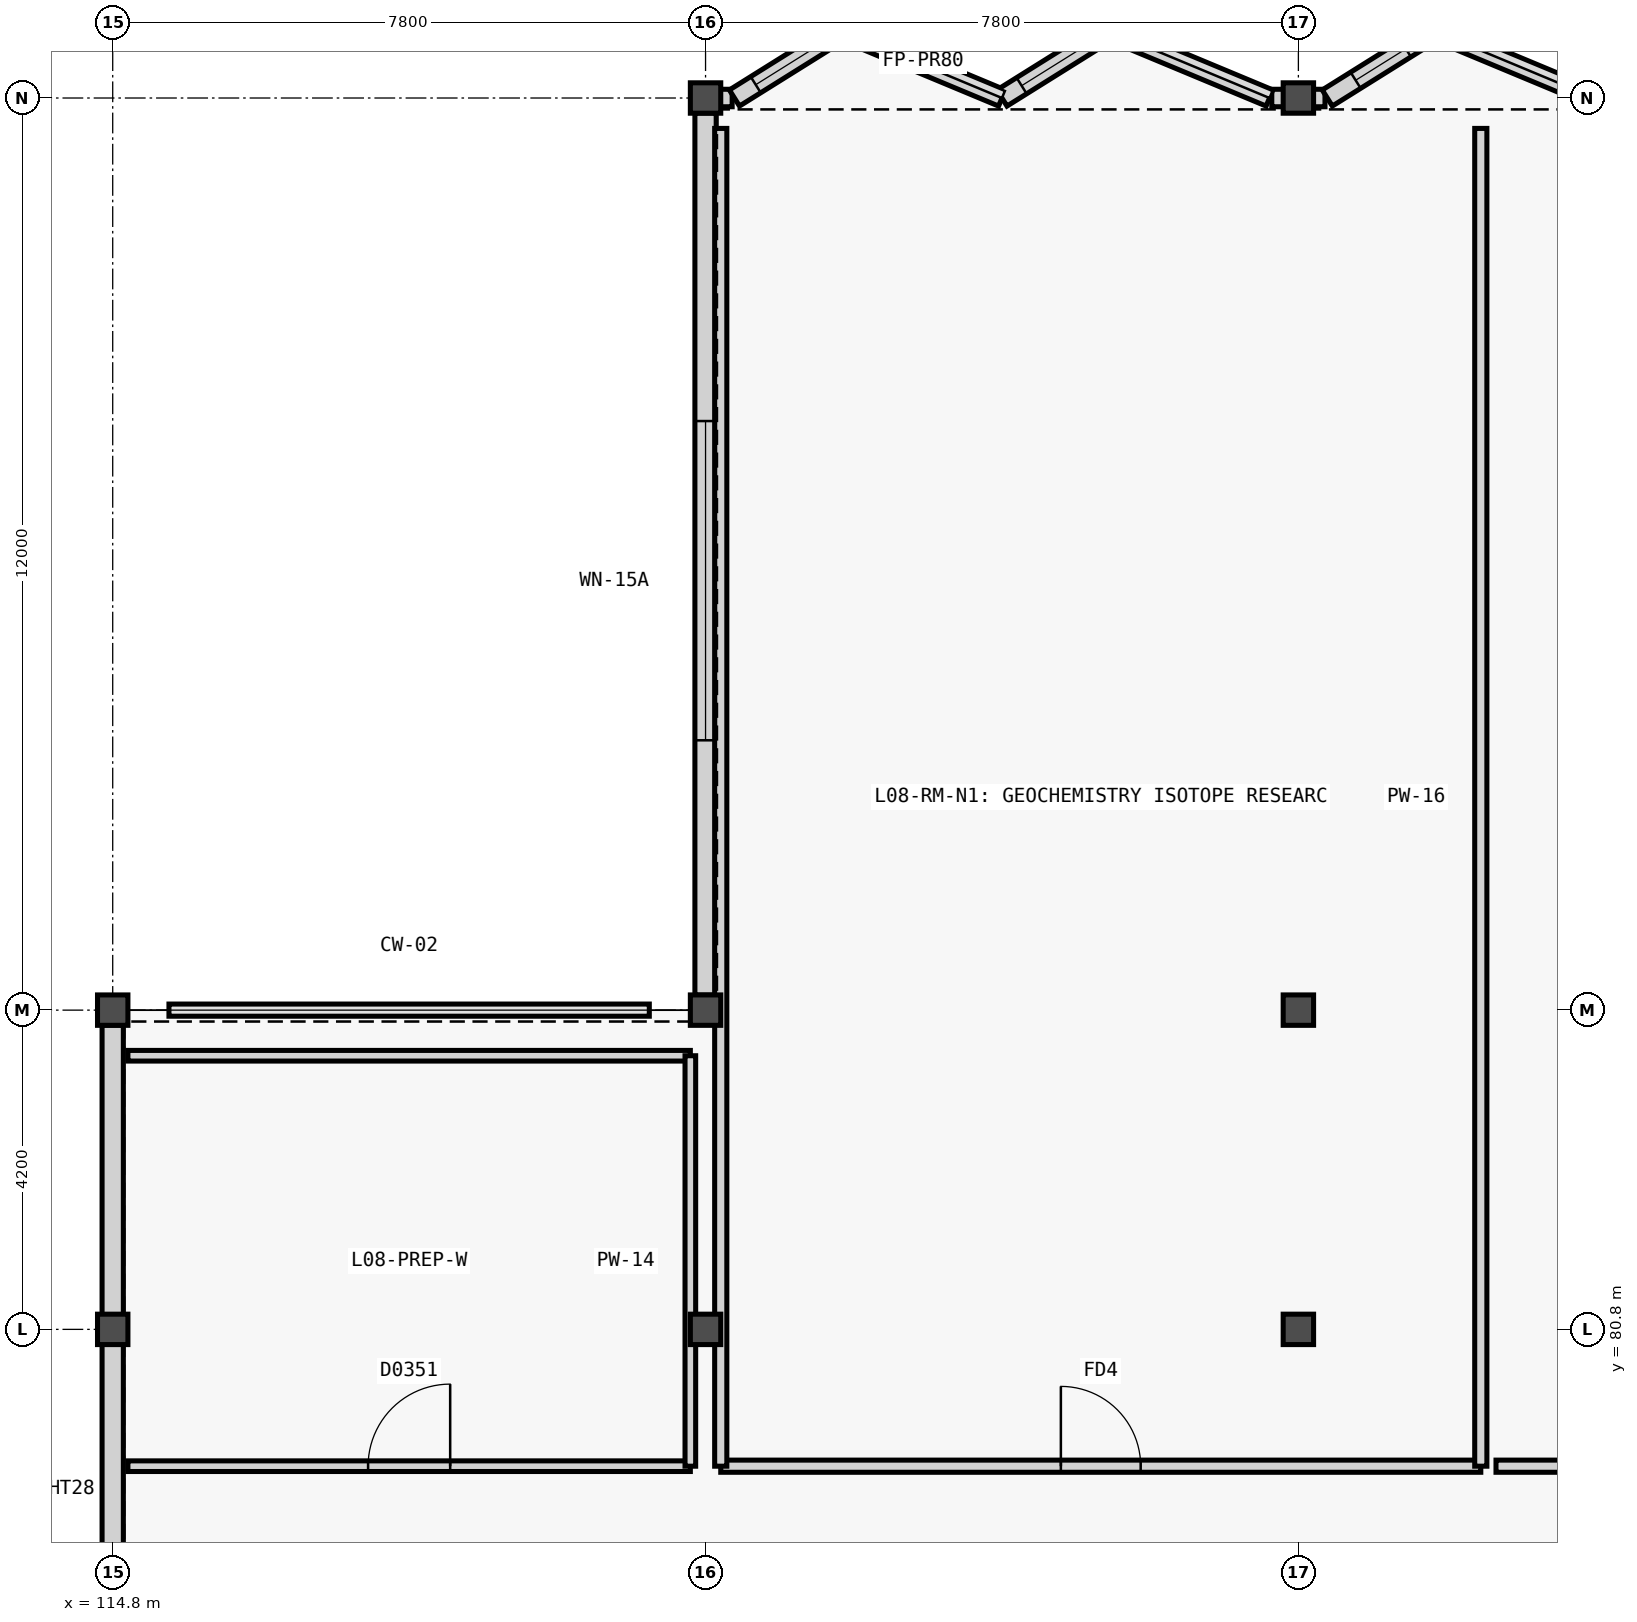
"""IFC4 building model, lengths in metres.
Left out: names, types, materials, properties, quantities, classifications, styles, units other than length and angle.
Written with IfcOpenShell. Run it as: python <this file> out.ifc"""

import sys

from ifc_helpers import new_model, si_unit, direction, frame, frame_2d, origin, origin_2d, place, context, subcontext, project, spatial, rectangle, extrude, element, fill, save


model = new_model("IFC4")
c1 = context("Model", 3, precision=1e-05, world=origin(), true_north=direction((0.0, 1.0)))
c2 = subcontext(c1, "Body", "Model", "MODEL_VIEW")
j1 = project(units=[si_unit("LENGTHUNIT", "METRE"), si_unit("PLANEANGLEUNIT", "RADIAN")], contexts=[c1])
p1 = place(None, origin())
s1 = spatial("IfcSite", under=j1, at=p1, CompositionType="ELEMENT")
p2 = place(p1, origin())
s2 = spatial("IfcBuilding", under=s1, at=p2, CompositionType="ELEMENT")
p3 = place(p2, frame((0.0, 0.0, 32.4)))
s3 = spatial("IfcBuildingStorey", under=s2, at=p3, CompositionType="ELEMENT", Elevation=32.4)
for number, where, z_axis, x_axis in (
    (1, (114.8, 80.8, 0.0), (0.0, 0.0, 1.0), (1.0, 0.0, 0.0)),
    (2, (114.8, 85.0, 0.0), (0.0, 0.0, 1.0), (1.0, 0.0, 0.0)),
    (3, (122.6, 80.8, 0.0), (0.0, 0.0, 1.0), (1.0, 0.0, 0.0)),
    (4, (122.6, 85.0, 0.0), (0.0, 0.0, 1.0), (1.0, 0.0, 0.0)),
    (5, (122.6, 97.0, 0.0), (0.0, 0.0, 1.0), (1.0, 0.0, 0.0)),
    (6, (130.4, 80.8, 0.0), (0.0, 0.0, 1.0), (1.0, 0.0, 0.0)),
    (7, (130.4, 85.0, 0.0), (0.0, 0.0, 1.0), (1.0, 0.0, 0.0)),
    (8, (130.4, 97.0, 0.0), (0.0, 0.0, 1.0), (1.0, 0.0, 0.0)),
):
    element("IfcColumn", number, at=place(p3, frame(where, z_axis=z_axis, x_axis=x_axis)), inside=s3, PredefinedType="COLUMN", context=c2, shape_type="SweptSolid", body=[
        extrude(rectangle(XDim=0.4, YDim=0.4, at=origin_2d()), origin(), (0.0, 0.0, 1.0), 3.6),
    ])
p4 = place(p3, frame((122.6, 85.198, 0.0), z_axis=(0.0, 0.0, 1.0), x_axis=(0.0, 1.0, 0.0)))
e9 = element("IfcWall", 9, at=p4, inside=s3, PredefinedType="SOLIDWALL", context=c2, shape_type="SweptSolid", body=[
    extrude(rectangle(XDim=11.604, YDim=0.28, at=frame_2d((5.802, 0.0))), origin(), (0.0, 0.0, 1.0), 2.9),
])
p5 = place(p4, frame((3.352, 0.0, 0.82)))
e10 = element("IfcOpeningElement", 10, at=p5, cuts=e9, PredefinedType="OPENING", context=c2, shape_type="SweptSolid", body=[
    extrude(rectangle(XDim=4.2, YDim=1.5, at=frame_2d((2.1, 0.75))), frame((0.0, 0.15, 0.0), z_axis=(0.0, -1.0, 0.0), x_axis=(1.0, 0.0, 0.0)), (0.0, 0.0, 1.0), 0.3),
])
p6 = place(p3, frame((114.8, 72.598, 0.0), z_axis=(0.0, 0.0, 1.0), x_axis=(0.0, 1.0, 0.0)))
e11 = element("IfcWall", 11, at=p6, inside=s3, PredefinedType="SOLIDWALL", context=c2, shape_type="SweptSolid", body=[
    extrude(rectangle(XDim=12.204, YDim=0.28, at=frame_2d((6.102, 0.0))), origin(), (0.0, 0.0, 1.0), 2.8),
])
for number, where, z_axis, x_axis in (
    (12, (122.6, 97.0, 0.0), (0.0, 0.0, 1.0), (1.0, 0.0, 0.0)),
    (13, (130.05, 97.0, 0.0), (0.0, 0.0, 1.0), (1.0, 0.0, 0.0)),
):
    element("IfcWall", number, at=place(p3, frame(where, z_axis=z_axis, x_axis=x_axis)), inside=s3, PredefinedType="SOLIDWALL", context=c2, shape_type="SweptSolid", body=[
        extrude(rectangle(XDim=0.35, YDim=0.23, at=frame_2d((0.175, 0.0))), origin(), (0.0, 0.0, 1.0), 3.36),
    ])
p7 = place(p3, frame((130.4, 97.0, 0.0), z_axis=(0.0, 0.0, 1.0), x_axis=(1.0, 0.0, 0.0)))
e14 = element("IfcWall", 14, at=p7, inside=s3, PredefinedType="SOLIDWALL", context=c2, shape_type="SweptSolid", body=[
    extrude(rectangle(XDim=0.35, YDim=0.23, at=frame_2d((0.175, 0.0))), origin(), (0.0, 0.0, 1.0), 3.36),
])
p8 = place(p3, frame((122.98, 97.0, 0.0), z_axis=(0.0, 0.0, 1.0), x_axis=(0.848023086369, 0.529959286158, 0.0)))
e15 = element("IfcWall", 15, at=p8, inside=s3, PredefinedType="SOLIDWALL", context=c2, shape_type="SweptSolid", body=[
    extrude(rectangle(XDim=1.66, YDim=0.25, at=frame_2d((0.83, 0.0))), origin(), (0.0, 0.0, 1.0), 3.36),
])
p9 = place(p8, frame((0.33, 0.0, 0.82)))
e16 = element("IfcOpeningElement", 16, at=p9, cuts=e15, PredefinedType="OPENING", context=c2, shape_type="SweptSolid", body=[
    extrude(rectangle(XDim=1.0, YDim=1.35, at=frame_2d((0.5, 0.675))), frame((0.0, 0.135, 0.0), z_axis=(0.0, -1.0, 0.0), x_axis=(1.0, 0.0, 0.0)), (0.0, 0.0, 1.0), 0.27),
])
p10 = place(p3, frame((124.388, 97.88, 0.0), z_axis=(0.0, 0.0, 1.0), x_axis=(0.92309902008, -0.384562347517, 0.0)))
e17 = element("IfcWall", 17, at=p10, inside=s3, PredefinedType="SOLIDWALL", context=c2, shape_type="SweptSolid", body=[
    extrude(rectangle(XDim=2.288, YDim=0.23, at=frame_2d((1.144, 0.0))), origin(), (0.0, 0.0, 1.0), 3.36),
])
p11 = place(p3, frame((126.5, 97.0, 0.0), z_axis=(0.0, 0.0, 1.0), x_axis=(0.848023086369, 0.529959286158, 0.0)))
e18 = element("IfcWall", 18, at=p11, inside=s3, PredefinedType="SOLIDWALL", context=c2, shape_type="SweptSolid", body=[
    extrude(rectangle(XDim=1.66, YDim=0.25, at=frame_2d((0.83, 0.0))), origin(), (0.0, 0.0, 1.0), 3.36),
])
p12 = place(p11, frame((0.305, 0.0, 0.82)))
e19 = element("IfcOpeningElement", 19, at=p12, cuts=e18, PredefinedType="OPENING", context=c2, shape_type="SweptSolid", body=[
    extrude(rectangle(XDim=1.05, YDim=1.4, at=frame_2d((0.525, 0.7))), frame((0.0, 0.135, 0.0), z_axis=(0.0, -1.0, 0.0), x_axis=(1.0, 0.0, 0.0)), (0.0, 0.0, 1.0), 0.27),
])
p13 = place(p3, frame((127.908, 97.88, 0.0), z_axis=(0.0, 0.0, 1.0), x_axis=(0.92309902008, -0.384562347517, 0.0)))
e20 = element("IfcWall", 20, at=p13, inside=s3, PredefinedType="SOLIDWALL", context=c2, shape_type="SweptSolid", body=[
    extrude(rectangle(XDim=2.288, YDim=0.23, at=frame_2d((1.144, 0.0))), origin(), (0.0, 0.0, 1.0), 3.36),
])
p14 = place(p3, frame((130.78, 97.0, 0.0), z_axis=(0.0, 0.0, 1.0), x_axis=(0.848023086369, 0.529959286158, 0.0)))
e21 = element("IfcWall", 21, at=p14, inside=s3, PredefinedType="SOLIDWALL", context=c2, shape_type="SweptSolid", body=[
    extrude(rectangle(XDim=1.66, YDim=0.25, at=frame_2d((0.83, 0.0))), origin(), (0.0, 0.0, 1.0), 3.36),
])
p15 = place(p14, frame((0.44, 0.0, 0.82)))
e22 = element("IfcOpeningElement", 22, at=p15, cuts=e21, PredefinedType="OPENING", context=c2, shape_type="SweptSolid", body=[
    extrude(rectangle(XDim=0.78, YDim=1.3, at=frame_2d((0.39, 0.65))), frame((0.0, 0.135, 0.0), z_axis=(0.0, -1.0, 0.0), x_axis=(1.0, 0.0, 0.0)), (0.0, 0.0, 1.0), 0.27),
])
p16 = place(p3, frame((132.188, 97.88, 0.0), z_axis=(0.0, 0.0, 1.0), x_axis=(0.92309902008, -0.384562347517, 0.0)))
e23 = element("IfcWall", 23, at=p16, inside=s3, PredefinedType="SOLIDWALL", context=c2, shape_type="SweptSolid", body=[
    extrude(rectangle(XDim=2.288, YDim=0.23, at=frame_2d((1.144, 0.0))), origin(), (0.0, 0.0, 1.0), 3.36),
])
p17 = place(p3, frame((115.0, 79.0, 0.0), z_axis=(0.0, 0.0, 1.0), x_axis=(1.0, 0.0, 0.0)))
e24 = element("IfcWall", 24, at=p17, inside=s3, PredefinedType="PARTITIONING", context=c2, shape_type="SweptSolid", body=[
    extrude(rectangle(XDim=7.4, YDim=0.14, at=frame_2d((3.7, 0.0))), origin(), (0.0, 0.0, 1.0), 3.34),
])
p18 = place(p17, frame((3.16, 0.0, 0.0)))
e25 = element("IfcOpeningElement", 25, at=p18, cuts=e24, PredefinedType="OPENING", context=c2, shape_type="SweptSolid", body=[
    extrude(rectangle(XDim=1.08, YDim=2.2, at=frame_2d((0.54, 1.1))), frame((0.0, 0.08, 0.0), z_axis=(0.0, -1.0, 0.0), x_axis=(1.0, 0.0, 0.0)), (0.0, 0.0, 1.0), 0.16),
])
p19 = place(p3, frame((115.0, 84.4, 0.0), z_axis=(0.0, 0.0, 1.0), x_axis=(1.0, 0.0, 0.0)))
e26 = element("IfcWall", 26, at=p19, inside=s3, PredefinedType="PARTITIONING", context=c2, shape_type="SweptSolid", body=[
    extrude(rectangle(XDim=7.4, YDim=0.14, at=frame_2d((3.7, 0.0))), origin(), (0.0, 0.0, 1.0), 3.34),
])
p20 = place(p3, frame((122.4, 79.0, 0.0), z_axis=(0.0, 0.0, 1.0), x_axis=(0.0, 1.0, 0.0)))
e27 = element("IfcWall", 27, at=p20, inside=s3, PredefinedType="PARTITIONING", context=c2, shape_type="SweptSolid", body=[
    extrude(rectangle(XDim=5.4, YDim=0.14, at=frame_2d((2.7, 0.0))), origin(), (0.0, 0.0, 1.0), 2.88),
])
p21 = place(p3, frame((122.8, 79.0, 0.0), z_axis=(0.0, 0.0, 1.0), x_axis=(1.0, 0.0, 0.0)))
e28 = element("IfcWall", 28, at=p21, inside=s3, PredefinedType="PARTITIONING", context=c2, shape_type="SweptSolid", body=[
    extrude(rectangle(XDim=10.0, YDim=0.16, at=frame_2d((5.0, 0.0))), origin(), (0.0, 0.0, 1.0), 3.34),
])
p22 = place(p21, frame((4.475, 0.0, 0.0)))
e29 = element("IfcOpeningElement", 29, at=p22, cuts=e28, PredefinedType="OPENING", context=c2, shape_type="SweptSolid", body=[
    extrude(rectangle(XDim=1.05, YDim=2.15, at=frame_2d((0.525, 1.075))), frame((0.0, 0.09, 0.0), z_axis=(0.0, -1.0, 0.0), x_axis=(1.0, 0.0, 0.0)), (0.0, 0.0, 1.0), 0.18),
])
p23 = place(p3, frame((122.8, 79.0, 0.0), z_axis=(0.0, 0.0, 1.0), x_axis=(0.0, 1.0, 0.0)))
e30 = element("IfcWall", 30, at=p23, inside=s3, PredefinedType="PARTITIONING", context=c2, shape_type="SweptSolid", body=[
    extrude(rectangle(XDim=17.6, YDim=0.16, at=frame_2d((8.8, 0.0))), origin(), (0.0, 0.0, 1.0), 2.88),
])
p24 = place(p3, frame((132.8, 79.0, 0.0), z_axis=(0.0, 0.0, 1.0), x_axis=(0.0, 1.0, 0.0)))
e31 = element("IfcWall", 31, at=p24, inside=s3, PredefinedType="PARTITIONING", context=c2, shape_type="SweptSolid", body=[
    extrude(rectangle(XDim=17.6, YDim=0.16, at=frame_2d((8.8, 0.0))), origin(), (0.0, 0.0, 1.0), 3.34),
])
p25 = place(p3, frame((133.0, 79.0, 0.0), z_axis=(0.0, 0.0, 1.0), x_axis=(1.0, 0.0, 0.0)))
e32 = element("IfcWall", 32, at=p25, inside=s3, PredefinedType="PARTITIONING", context=c2, shape_type="SweptSolid", body=[
    extrude(rectangle(XDim=9.8, YDim=0.16, at=frame_2d((4.9, 0.0))), origin(), (0.0, 0.0, 1.0), 3.34),
])
p26 = place(p25, frame((4.275, 0.0, 0.0)))
e33 = element("IfcOpeningElement", 33, at=p26, cuts=e32, PredefinedType="OPENING", context=c2, shape_type="SweptSolid", body=[
    extrude(rectangle(XDim=1.25, YDim=2.2, at=frame_2d((0.625, 1.1))), frame((0.0, 0.09, 0.0), z_axis=(0.0, -1.0, 0.0), x_axis=(1.0, 0.0, 0.0)), (0.0, 0.0, 1.0), 0.18),
])
p27 = place(p5, origin())
e34 = element("IfcWindow", 34, at=p27, inside=s3, PartitioningType="SINGLE_PANEL", PredefinedType="WINDOW", context=c2, shape_type="SweptSolid", body=[
    extrude(rectangle(XDim=4.2, YDim=1.5, at=frame_2d((2.1, 0.75))), frame((0.0, 0.03, 0.0), z_axis=(0.0, -1.0, 0.0), x_axis=(1.0, 0.0, 0.0)), (0.0, 0.0, 1.0), 0.06),
])
fill(e10, e34)
p28 = place(p9, origin())
e35 = element("IfcWindow", 35, at=p28, inside=s3, PartitioningType="SINGLE_PANEL", PredefinedType="WINDOW", context=c2, shape_type="SweptSolid", body=[
    extrude(rectangle(XDim=1.0, YDim=1.35, at=frame_2d((0.5, 0.675))), frame((0.0, 0.03, 0.0), z_axis=(0.0, -1.0, 0.0), x_axis=(1.0, 0.0, 0.0)), (0.0, 0.0, 1.0), 0.06),
])
fill(e16, e35)
p29 = place(p12, origin())
e36 = element("IfcWindow", 36, at=p29, inside=s3, PartitioningType="SINGLE_PANEL", PredefinedType="WINDOW", context=c2, shape_type="SweptSolid", body=[
    extrude(rectangle(XDim=1.05, YDim=1.4, at=frame_2d((0.525, 0.7))), frame((0.0, 0.03, 0.0), z_axis=(0.0, -1.0, 0.0), x_axis=(1.0, 0.0, 0.0)), (0.0, 0.0, 1.0), 0.06),
])
fill(e19, e36)
p30 = place(p15, origin())
e37 = element("IfcWindow", 37, at=p30, inside=s3, PartitioningType="SINGLE_PANEL", PredefinedType="WINDOW", context=c2, shape_type="SweptSolid", body=[
    extrude(rectangle(XDim=0.78, YDim=1.3, at=frame_2d((0.39, 0.65))), frame((0.0, 0.03, 0.0), z_axis=(0.0, -1.0, 0.0), x_axis=(1.0, 0.0, 0.0)), (0.0, 0.0, 1.0), 0.06),
])
fill(e22, e37)
p31 = place(p18, origin())
e38 = element("IfcDoor", 38, at=p31, inside=s3, OperationType="SINGLE_SWING_RIGHT", PredefinedType="DOOR", context=c2, shape_type="SweptSolid", body=[
    extrude(rectangle(XDim=1.08, YDim=2.2, at=frame_2d((0.54, 1.1))), frame((0.0, 0.025, 0.0), z_axis=(0.0, -1.0, 0.0), x_axis=(1.0, 0.0, 0.0)), (0.0, 0.0, 1.0), 0.05),
])
fill(e25, e38)
p32 = place(p22, origin())
e39 = element("IfcDoor", 39, at=p32, inside=s3, OperationType="SINGLE_SWING_LEFT", PredefinedType="DOOR", context=c2, shape_type="SweptSolid", body=[
    extrude(rectangle(XDim=1.05, YDim=2.15, at=frame_2d((0.525, 1.075))), frame((0.0, 0.025, 0.0), z_axis=(0.0, -1.0, 0.0), x_axis=(1.0, 0.0, 0.0)), (0.0, 0.0, 1.0), 0.05),
])
fill(e29, e39)
save(model, sys.argv[1])
